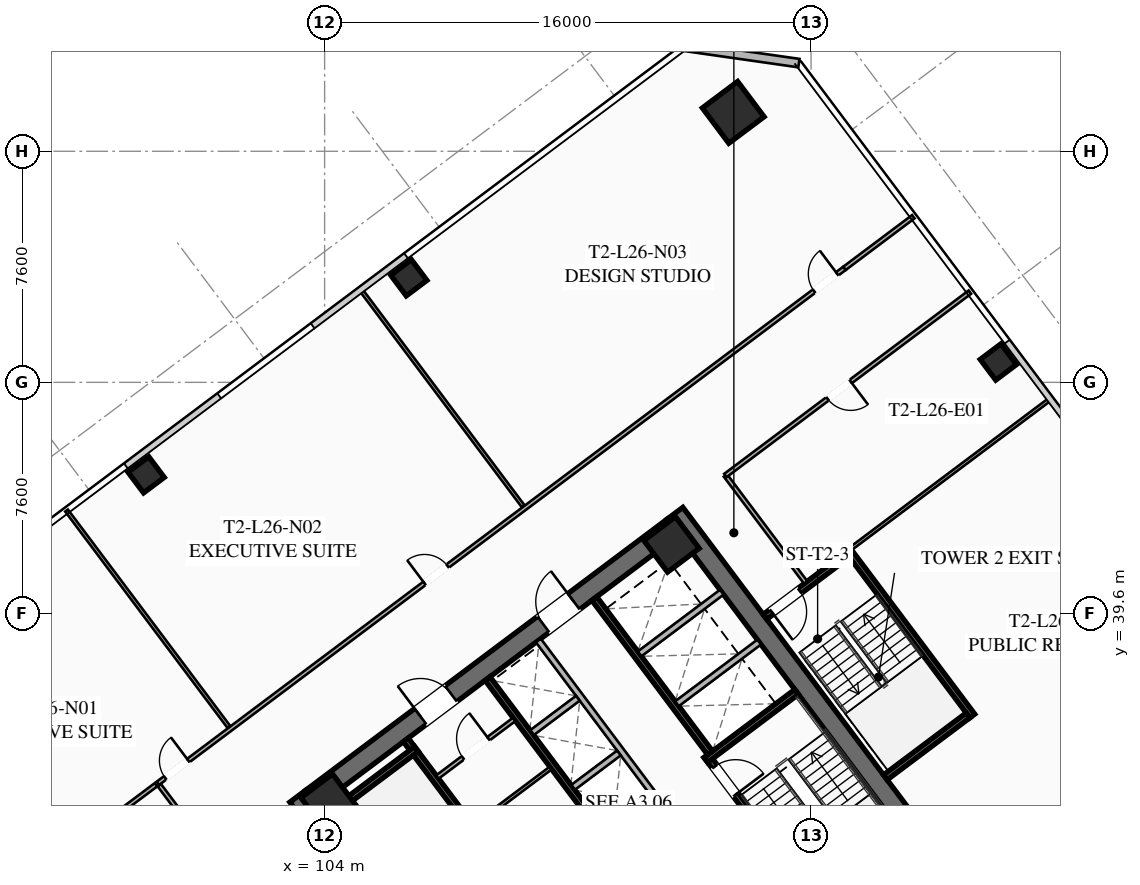
"""IFC4 building model, lengths in metres.
Left out: names, types, materials, properties, quantities, classifications, styles, units other than length and angle.
Written with IfcOpenShell. Run it as: python <this file> out.ifc"""

import sys

from ifc_helpers import new_model, si_unit, direction, frame, frame_2d, origin, origin_2d, place, context, subcontext, project, spatial, rectangle, hollow_rectangle, extrude, element, fill, save


model = new_model("IFC4")
c1 = context("Model", 3, precision=1e-05, world=origin(), true_north=direction((0.0, 1.0)))
c2 = subcontext(c1, "Body", "Model", "MODEL_VIEW")
j1 = project(units=[si_unit("LENGTHUNIT", "METRE"), si_unit("PLANEANGLEUNIT", "RADIAN")], contexts=[c1])
p1 = place(None, origin())
s1 = spatial("IfcSite", under=j1, at=p1, CompositionType="ELEMENT")
p2 = place(p1, origin())
s2 = spatial("IfcBuilding", under=s1, at=p2, CompositionType="ELEMENT")
p3 = place(p2, frame((0.0, 0.0, 99.15)))
s3 = spatial("IfcBuildingStorey", under=s2, at=p3, CompositionType="ELEMENT", Elevation=99.15)
for number, where, z_axis, x_axis in (
    (1, (112.476, 21.107, 0.0), (0.0, 0.0, 1.0), (-0.6, 0.8, 0.0)),
    (2, (115.524, 42.893, 0.0), (0.0, 0.0, 1.0), (0.6, -0.8, 0.0)),
):
    element("IfcWall", number, at=place(p3, frame(where, z_axis=z_axis, x_axis=x_axis)), inside=s3, PredefinedType="SHEAR", context=c2, shape_type="SweptSolid", body=[
        extrude(rectangle(XDim=15.6, YDim=0.65, at=frame_2d((7.8, 0.0))), origin(), (0.0, 0.0, 1.0), 3.55),
    ])
p4 = place(p3, frame((103.571, 33.522, 0.0), z_axis=(0.0, 0.0, 1.0), x_axis=(0.799998028465, 0.600002628705, 0.0)))
e3 = element("IfcWall", 3, at=p4, inside=s3, PredefinedType="SHEAR", context=c2, shape_type="SweptSolid", body=[
    extrude(rectangle(XDim=14.86, YDim=0.65, at=frame_2d((7.43, 0.0))), origin(), (0.0, 0.0, 1.0), 3.55),
])
p5 = place(p4, frame((4.48, 0.0, 0.0)))
e4 = element("IfcOpeningElement", 4, at=p5, cuts=e3, PredefinedType="OPENING", context=c2, shape_type="SweptSolid", body=[
    extrude(rectangle(XDim=1.25, YDim=2.25, at=frame_2d((0.625, 1.125))), frame((0.0, 0.335, 0.0), z_axis=(0.0, -1.0, 0.0), x_axis=(1.0, 0.0, 0.0)), (0.0, 0.0, 1.0), 0.67),
])
p6 = place(p4, frame((9.53, 0.0, 0.0)))
e5 = element("IfcOpeningElement", 5, at=p6, cuts=e3, PredefinedType="OPENING", context=c2, shape_type="SweptSolid", body=[
    extrude(rectangle(XDim=1.25, YDim=2.25, at=frame_2d((0.625, 1.125))), frame((0.0, 0.335, 0.0), z_axis=(0.0, -1.0, 0.0), x_axis=(1.0, 0.0, 0.0)), (0.0, 0.0, 1.0), 0.67),
])
for number, where, z_axis, x_axis in (
    (6, (115.41, 41.87, 0.0), (0.0, 0.0, 1.0), (0.8, 0.6, 0.0)),
    (7, (104.13, 33.41, 0.0), (0.0, 0.0, 1.0), (0.8, 0.6, 0.0)),
):
    element("IfcColumn", number, at=place(p3, frame(where, z_axis=z_axis, x_axis=x_axis)), inside=s3, PredefinedType="COLUMN", context=c2, shape_type="SweptSolid", body=[
        extrude(hollow_rectangle(XDim=1.3, YDim=1.3, WallThickness=0.05, at=origin_2d()), origin(), (0.0, 0.0, 1.0), 3.35),
    ])
p7 = place(p3, frame((117.44, 56.08, 0.0), z_axis=(0.0, 0.0, 1.0), x_axis=(0.799999996291, 0.600000004945, 0.0)))
e8 = element("IfcColumn", 8, at=p7, inside=s3, PredefinedType="COLUMN", context=c2, shape_type="SweptSolid", body=[
    extrude(hollow_rectangle(XDim=1.45, YDim=1.45, WallThickness=0.055, at=origin_2d()), origin(), (0.0, 0.0, 1.0), 3.35),
])
for number, where, z_axis, x_axis in (
    (9, (126.16, 47.87, 0.0), (0.0, 0.0, 1.0), (0.8, 0.6, 0.0)),
    (10, (106.77, 50.64, 0.0), (0.0, 0.0, 1.0), (0.8, 0.6, 0.0)),
    (11, (98.13, 44.16, 0.0), (0.0, 0.0, 1.0), (0.8, 0.6, 0.0)),
):
    element("IfcColumn", number, at=place(p3, frame(where, z_axis=z_axis, x_axis=x_axis)), inside=s3, PredefinedType="COLUMN", context=c2, shape_type="SweptSolid", body=[
        extrude(hollow_rectangle(XDim=0.85, YDim=0.85, WallThickness=0.035, at=origin_2d()), origin(), (0.0, 0.0, 1.0), 3.35),
    ])
p8 = place(p3, frame((115.82, 58.24, 0.0), z_axis=(0.0, 0.0, 1.0), x_axis=(0.989948214866, -0.141430307517, 0.0)))
e12 = element("IfcWall", 12, at=p8, inside=s3, PredefinedType="SOLIDWALL", context=c2, shape_type="SweptSolid", body=[
    extrude(rectangle(XDim=3.818, YDim=0.28, at=frame_2d((1.909, 0.0))), origin(), (0.0, 0.0, 1.0), 3.35),
])
p9 = place(p3, frame((111.44, 29.08, 0.0), z_axis=(0.0, 0.0, 1.0), x_axis=(-0.600009827119, 0.799992629566, 0.0)))
e13 = element("IfcWall", 13, at=p9, inside=s3, PredefinedType="SHEAR", context=c2, shape_type="SweptSolid", body=[
    extrude(rectangle(XDim=7.95, YDim=0.2, at=frame_2d((3.975, 0.0))), origin(), (0.0, 0.0, 1.0), 3.35),
])
p10 = place(p9, frame((0.45, 0.0, 0.0)))
e14 = element("IfcOpeningElement", 14, at=p10, cuts=e13, PredefinedType="OPENING", context=c2, shape_type="SweptSolid", body=[
    extrude(rectangle(XDim=1.15, YDim=2.2, at=frame_2d((0.575, 1.1))), frame((0.0, 0.11, 0.0), z_axis=(0.0, -1.0, 0.0), x_axis=(1.0, 0.0, 0.0)), (0.0, 0.0, 1.0), 0.22),
])
p11 = place(p3, frame((104.036, 32.902, 0.0), z_axis=(0.0, 0.0, 1.0), x_axis=(0.800039270442, 0.59994763584, 0.0)))
e15 = element("IfcWall", 15, at=p11, inside=s3, PredefinedType="SHEAR", context=c2, shape_type="SweptSolid", body=[
    extrude(rectangle(XDim=3.73, YDim=0.2, at=frame_2d((1.865, 0.0))), origin(), (0.0, 0.0, 1.0), 3.35),
])
p12 = place(p3, frame((116.56, 34.92, 0.0), z_axis=(0.0, 0.0, 1.0), x_axis=(0.600009827119, -0.799992629566, 0.0)))
e16 = element("IfcWall", 16, at=p12, inside=s3, PredefinedType="SHEAR", context=c2, shape_type="SweptSolid", body=[
    extrude(rectangle(XDim=7.95, YDim=0.2, at=frame_2d((3.975, 0.0))), origin(), (0.0, 0.0, 1.0), 3.35),
])
p13 = place(p12, frame((0.45, 0.0, 0.0)))
e17 = element("IfcOpeningElement", 17, at=p13, cuts=e16, PredefinedType="OPENING", context=c2, shape_type="SweptSolid", body=[
    extrude(rectangle(XDim=1.15, YDim=2.2, at=frame_2d((0.575, 1.1))), frame((0.0, 0.11, 0.0), z_axis=(0.0, -1.0, 0.0), x_axis=(1.0, 0.0, 0.0)), (0.0, 0.0, 1.0), 0.22),
])
p14 = place(p3, frame((116.54, 34.78, 0.0), z_axis=(0.0, 0.0, 1.0), x_axis=(0.799984290658, 0.600020945218, 0.0)))
e18 = element("IfcWall", 18, at=p14, inside=s3, PredefinedType="SHEAR", context=c2, shape_type="SweptSolid", body=[
    extrude(rectangle(XDim=3.73, YDim=0.2, at=frame_2d((1.865, 0.0))), origin(), (0.0, 0.0, 1.0), 3.35),
])
p15 = place(p3, frame((117.938, 26.016, 0.0), z_axis=(0.0, 0.0, 1.0), x_axis=(-0.600005463273, 0.799995902516, 0.0)))
e19 = element("IfcWall", 19, at=p15, inside=s3, PredefinedType="SHEAR", context=c2, shape_type="SweptSolid", body=[
    extrude(rectangle(XDim=14.3, YDim=0.2, at=frame_2d((7.15, 0.0))), origin(), (0.0, 0.0, 1.0), 3.35),
])
p16 = place(p3, frame((112.87, 40.09, 0.0), z_axis=(0.0, 0.0, 1.0), x_axis=(0.599975393228, -0.800018454488, 0.0)))
e20 = element("IfcWall", 20, at=p16, inside=s3, PredefinedType="SHEAR", context=c2, shape_type="SweptSolid", body=[
    extrude(rectangle(XDim=6.35, YDim=0.2, at=frame_2d((3.175, 0.0))), origin(), (0.0, 0.0, 1.0), 3.35),
])
for number, where, z_axis, x_axis in (
    (21, (115.59, 36.63, 0.0), (0.0, 0.0, 1.0), (0.8, 0.6, 0.0)),
    (22, (114.36, 38.27, 0.0), (0.0, 0.0, 1.0), (0.8, 0.6, 0.0)),
):
    element("IfcWall", number, at=place(p3, frame(where, z_axis=z_axis, x_axis=x_axis)), inside=s3, PredefinedType="SOLIDWALL", context=c2, shape_type="SweptSolid", body=[
        extrude(rectangle(XDim=3.38, YDim=0.2, at=frame_2d((1.69, 0.0))), origin(), (0.0, 0.0, 1.0), 3.35),
    ])
p17 = place(p3, frame((107.71, 34.22, 0.0), z_axis=(0.0, 0.0, 1.0), x_axis=(0.799981399002, 0.60002480053, 0.0)))
e23 = element("IfcWall", 23, at=p17, inside=s3, PredefinedType="PARTITIONING", context=c2, shape_type="SweptSolid", body=[
    extrude(rectangle(XDim=3.15, YDim=0.135, at=frame_2d((1.575, 0.0))), origin(), (0.0, 0.0, 1.0), 2.703),
])
p18 = place(p17, frame((1.05, 0.0, 0.0)))
e24 = element("IfcOpeningElement", 24, at=p18, cuts=e23, PredefinedType="OPENING", context=c2, shape_type="SweptSolid", body=[
    extrude(rectangle(XDim=1.05, YDim=2.2, at=frame_2d((0.525, 1.1))), frame((0.0, 0.077, 0.0), z_axis=(0.0, -1.0, 0.0), x_axis=(1.0, 0.0, 0.0)), (0.0, 0.0, 1.0), 0.155),
])
p19 = place(p3, frame((108.91, 32.62, 0.0), z_axis=(0.0, 0.0, 1.0), x_axis=(0.800018601094, 0.59997519774, 0.0)))
e25 = element("IfcWall", 25, at=p19, inside=s3, PredefinedType="PARTITIONING", context=c2, shape_type="SweptSolid", body=[
    extrude(rectangle(XDim=3.15, YDim=0.11, at=frame_2d((1.575, 0.0))), origin(), (0.0, 0.0, 1.0), 2.703),
])
p20 = place(p3, frame((115.11, 33.27, 0.0), z_axis=(0.0, 0.0, 1.0), x_axis=(-0.600011488909, 0.79999138319, 0.0)))
e26 = element("IfcWall", 26, at=p20, inside=s3, PredefinedType="SOLIDWALL", context=c2, shape_type="SweptSolid", body=[
    extrude(rectangle(XDim=6.8, YDim=0.2, at=frame_2d((3.4, 0.0))), origin(), (0.0, 0.0, 1.0), 3.35),
])
p21 = place(p3, frame((112.176, 33.882, 0.0), z_axis=(0.0, 0.0, 1.0), x_axis=(0.8, 0.6, 0.0)))
e27 = element("IfcWall", 27, at=p21, inside=s3, PredefinedType="SOLIDWALL", context=c2, shape_type="SweptSolid", body=[
    extrude(rectangle(XDim=1.88, YDim=0.2, at=frame_2d((0.94, 0.0))), origin(), (0.0, 0.0, 1.0), 3.35),
])
p22 = place(p3, frame((110.826, 35.682, 0.0), z_axis=(0.0, 0.0, 1.0), x_axis=(0.799984418148, 0.600020775241, 0.0)))
e28 = element("IfcWall", 28, at=p22, inside=s3, PredefinedType="SOLIDWALL", context=c2, shape_type="SweptSolid", body=[
    extrude(rectangle(XDim=1.88, YDim=0.2, at=frame_2d((0.94, 0.0))), origin(), (0.0, 0.0, 1.0), 3.35),
])
p23 = place(p3, frame((125.304, 36.228, 0.0), z_axis=(0.0, 0.0, 1.0), x_axis=(-0.59998851072, 0.800008616831, 0.0)))
e29 = element("IfcWall", 29, at=p23, inside=s3, PredefinedType="SHEAR", context=c2, shape_type="SweptSolid", body=[
    extrude(rectangle(XDim=6.8, YDim=0.2, at=frame_2d((3.4, 0.0))), origin(), (0.0, 0.0, 1.0), 3.35),
])
p24 = place(p3, frame((121.204, 41.528, 0.0), z_axis=(0.0, 0.0, 1.0), x_axis=(-0.800017232136, -0.599977023131, 0.0)))
e30 = element("IfcWall", 30, at=p24, inside=s3, PredefinedType="SHEAR", context=c2, shape_type="SweptSolid", body=[
    extrude(rectangle(XDim=3.4, YDim=0.2, at=frame_2d((1.7, 0.0))), origin(), (0.0, 0.0, 1.0), 3.35),
])
p25 = place(p24, frame((1.975, 0.0, 0.0)))
e31 = element("IfcOpeningElement", 31, at=p25, cuts=e30, PredefinedType="OPENING", context=c2, shape_type="SweptSolid", body=[
    extrude(rectangle(XDim=1.15, YDim=2.2, at=frame_2d((0.575, 1.1))), frame((0.0, 0.11, 0.0), z_axis=(0.0, -1.0, 0.0), x_axis=(1.0, 0.0, 0.0)), (0.0, 0.0, 1.0), 0.22),
])
p26 = place(p3, frame((122.444, 34.208, 0.0), z_axis=(0.0, 0.0, 1.0), x_axis=(0.79999138319, 0.600011488909, 0.0)))
e32 = element("IfcWall", 32, at=p26, inside=s3, PredefinedType="SHEAR", context=c2, shape_type="SweptSolid", body=[
    extrude(rectangle(XDim=3.4, YDim=0.2, at=frame_2d((1.7, 0.0))), origin(), (0.0, 0.0, 1.0), 3.35),
])
p27 = place(p3, frame((119.824, 40.618, 0.0), z_axis=(0.0, 0.0, 1.0), x_axis=(-0.599982243973, 0.800013316712, 0.0)))
e33 = element("IfcWall", 33, at=p27, inside=s3, PredefinedType="PARTITIONING", context=c2, shape_type="SweptSolid", body=[
    extrude(rectangle(XDim=4.4, YDim=0.135, at=frame_2d((2.2, 0.0))), origin(), (0.0, 0.0, 1.0), 2.703),
])
p28 = place(p3, frame((98.516, 34.012, 0.0), z_axis=(0.0, 0.0, 1.0), x_axis=(0.8, 0.6, 0.0)))
e34 = element("IfcWall", 34, at=p28, inside=s3, PredefinedType="PARTITIONING", context=c2, shape_type="SweptSolid", body=[
    extrude(rectangle(XDim=28.23, YDim=0.135, at=frame_2d((14.115, 0.0))), origin(), (0.0, 0.0, 1.0), 2.703),
])
p29 = place(p28, frame((0.3, 0.0, 0.0)))
e35 = element("IfcOpeningElement", 35, at=p29, cuts=e34, PredefinedType="OPENING", context=c2, shape_type="SweptSolid", body=[
    extrude(rectangle(XDim=0.95, YDim=2.05, at=frame_2d((0.475, 1.025))), frame((0.0, 0.077, 0.0), z_axis=(0.0, -1.0, 0.0), x_axis=(1.0, 0.0, 0.0)), (0.0, 0.0, 1.0), 0.155),
])
p30 = place(p28, frame((10.962, 0.0, 0.0)))
e36 = element("IfcOpeningElement", 36, at=p30, cuts=e34, PredefinedType="OPENING", context=c2, shape_type="SweptSolid", body=[
    extrude(rectangle(XDim=0.95, YDim=2.05, at=frame_2d((0.475, 1.025))), frame((0.0, 0.077, 0.0), z_axis=(0.0, -1.0, 0.0), x_axis=(1.0, 0.0, 0.0)), (0.0, 0.0, 1.0), 0.155),
])
p31 = place(p28, frame((26.98, 0.0, 0.0)))
e37 = element("IfcOpeningElement", 37, at=p31, cuts=e34, PredefinedType="OPENING", context=c2, shape_type="SweptSolid", body=[
    extrude(rectangle(XDim=0.95, YDim=2.05, at=frame_2d((0.475, 1.025))), frame((0.0, 0.077, 0.0), z_axis=(0.0, -1.0, 0.0), x_axis=(1.0, 0.0, 0.0)), (0.0, 0.0, 1.0), 0.155),
])
p32 = place(p3, frame((121.1, 50.95, 0.0), z_axis=(0.0, 0.0, 1.0), x_axis=(0.799989647378, 0.600013803248, 0.0)))
e38 = element("IfcWall", 38, at=p32, inside=s3, PredefinedType="PARTITIONING", context=c2, shape_type="SweptSolid", body=[
    extrude(rectangle(XDim=2.83, YDim=0.135, at=frame_2d((1.415, 0.0))), origin(), (0.0, 0.0, 1.0), 2.703),
])
for number, where, z_axis, x_axis in (
    (39, (100.852, 35.864, 0.0), (0.0, 0.0, 1.0), (-0.6, 0.8, 0.0)),
    (40, (110.532, 43.124, 0.0), (0.0, 0.0, 1.0), (-0.6, 0.8, 0.0)),
):
    element("IfcWall", number, at=place(p3, frame(where, z_axis=z_axis, x_axis=x_axis)), inside=s3, PredefinedType="PARTITIONING", context=c2, shape_type="SweptSolid", body=[
        extrude(rectangle(XDim=8.9, YDim=0.11, at=frame_2d((4.45, 0.0))), origin(), (0.0, 0.0, 1.0), 2.703),
    ])
p33 = place(p3, frame((134.18, 33.51, 0.0), z_axis=(0.0, 0.0, 1.0), x_axis=(-0.8, -0.6, 0.0)))
e41 = element("IfcWall", 41, at=p33, inside=s3, PredefinedType="PARTITIONING", context=c2, shape_type="SweptSolid", body=[
    extrude(rectangle(XDim=28.23, YDim=0.135, at=frame_2d((14.115, 0.0))), origin(), (0.0, 0.0, 1.0), 2.703),
])
p34 = place(p33, frame((26.9, 0.0, 0.0)))
e42 = element("IfcOpeningElement", 42, at=p34, cuts=e41, PredefinedType="OPENING", context=c2, shape_type="SweptSolid", body=[
    extrude(rectangle(XDim=0.95, YDim=2.05, at=frame_2d((0.475, 1.025))), frame((0.0, 0.077, 0.0), z_axis=(0.0, -1.0, 0.0), x_axis=(1.0, 0.0, 0.0)), (0.0, 0.0, 1.0), 0.155),
])
p35 = place(p33, frame((16.296, 0.0, 0.0)))
e43 = element("IfcOpeningElement", 43, at=p35, cuts=e41, PredefinedType="OPENING", context=c2, shape_type="SweptSolid", body=[
    extrude(rectangle(XDim=0.95, YDim=2.05, at=frame_2d((0.475, 1.025))), frame((0.0, 0.077, 0.0), z_axis=(0.0, -1.0, 0.0), x_axis=(1.0, 0.0, 0.0)), (0.0, 0.0, 1.0), 0.155),
])
p36 = place(p33, frame((10.433, 0.0, 0.0)))
e44 = element("IfcOpeningElement", 44, at=p36, cuts=e41, PredefinedType="OPENING", context=c2, shape_type="SweptSolid", body=[
    extrude(rectangle(XDim=0.95, YDim=2.05, at=frame_2d((0.475, 1.025))), frame((0.0, 0.077, 0.0), z_axis=(0.0, -1.0, 0.0), x_axis=(1.0, 0.0, 0.0)), (0.0, 0.0, 1.0), 0.155),
])
p37 = place(p33, frame((0.38, 0.0, 0.0)))
e45 = element("IfcOpeningElement", 45, at=p37, cuts=e41, PredefinedType="OPENING", context=c2, shape_type="SweptSolid", body=[
    extrude(rectangle(XDim=0.95, YDim=2.05, at=frame_2d((0.475, 1.025))), frame((0.0, 0.077, 0.0), z_axis=(0.0, -1.0, 0.0), x_axis=(1.0, 0.0, 0.0)), (0.0, 0.0, 1.0), 0.155),
])
p38 = place(p3, frame((125.224, 50.168, 0.0), z_axis=(0.0, 0.0, 1.0), x_axis=(-0.8, -0.6, 0.0)))
e46 = element("IfcWall", 46, at=p38, inside=s3, PredefinedType="PARTITIONING", context=c2, shape_type="SweptSolid", body=[
    extrude(rectangle(XDim=10.05, YDim=0.135, at=frame_2d((5.025, 0.0))), origin(), (0.0, 0.0, 1.0), 2.703),
])
p39 = place(p38, frame((4.9, 0.0, 0.0)))
e47 = element("IfcOpeningElement", 47, at=p39, cuts=e46, PredefinedType="OPENING", context=c2, shape_type="SweptSolid", body=[
    extrude(rectangle(XDim=0.95, YDim=2.05, at=frame_2d((0.475, 1.025))), frame((0.0, 0.077, 0.0), z_axis=(0.0, -1.0, 0.0), x_axis=(1.0, 0.0, 0.0)), (0.0, 0.0, 1.0), 0.155),
])
p40 = place(p3, frame((125.208, 30.656, 0.0), z_axis=(0.0, 0.0, 1.0), x_axis=(0.8, 0.6, 0.0)))
e48 = element("IfcWall", 48, at=p40, inside=s3, PredefinedType="PARTITIONING", context=c2, shape_type="SweptSolid", body=[
    extrude(rectangle(XDim=11.72, YDim=0.135, at=frame_2d((5.86, 0.0))), origin(), (0.0, 0.0, 1.0), 2.703),
])
p41 = place(p40, frame((2.045, 0.0, 0.0)))
e49 = element("IfcOpeningElement", 49, at=p41, cuts=e48, PredefinedType="OPENING", context=c2, shape_type="SweptSolid", body=[
    extrude(rectangle(XDim=0.95, YDim=2.05, at=frame_2d((0.475, 1.025))), frame((0.0, 0.077, 0.0), z_axis=(0.0, -1.0, 0.0), x_axis=(1.0, 0.0, 0.0)), (0.0, 0.0, 1.0), 0.155),
])
p42 = place(p3, frame((127.864, 46.648, 0.0), z_axis=(0.0, 0.0, 1.0), x_axis=(-0.800007145523, -0.599990472518, 0.0)))
e50 = element("IfcWall", 50, at=p42, inside=s3, PredefinedType="PARTITIONING", context=c2, shape_type="SweptSolid", body=[
    extrude(rectangle(XDim=8.2, YDim=0.11, at=frame_2d((4.1, 0.0))), origin(), (0.0, 0.0, 1.0), 2.703),
])
p43 = place(p3, frame((111.548, 16.636, 0.0), z_axis=(0.0, 0.0, 1.0), x_axis=(-0.600003610192, 0.799997292343, 0.0)))
e51 = element("IfcWall", 51, at=p43, inside=s3, PredefinedType="PARTITIONING", context=c2, shape_type="SweptSolid", body=[
    extrude(rectangle(XDim=21.64, YDim=0.135, at=frame_2d((10.82, 0.0))), origin(), (0.0, 0.0, 1.0), 2.703),
])
p44 = place(p43, frame((0.3, 0.0, 0.0)))
e52 = element("IfcOpeningElement", 52, at=p44, cuts=e51, PredefinedType="OPENING", context=c2, shape_type="SweptSolid", body=[
    extrude(rectangle(XDim=0.95, YDim=2.05, at=frame_2d((0.475, 1.025))), frame((0.0, 0.077, 0.0), z_axis=(0.0, -1.0, 0.0), x_axis=(1.0, 0.0, 0.0)), (0.0, 0.0, 1.0), 0.155),
])
p45 = place(p3, frame((98.452, 33.964, 0.0), z_axis=(0.0, 0.0, 1.0), x_axis=(-0.799993202584, -0.600009063115, 0.0)))
e53 = element("IfcWall", 53, at=p45, inside=s3, PredefinedType="PARTITIONING", context=c2, shape_type="SweptSolid", body=[
    extrude(rectangle(XDim=8.62, YDim=0.135, at=frame_2d((4.31, 0.0))), origin(), (0.0, 0.0, 1.0), 2.703),
])
p46 = place(p5, origin())
e54 = element("IfcDoor", 54, at=p46, inside=s3, OperationType="SINGLE_SWING_LEFT", PredefinedType="DOOR", context=c2, shape_type="SweptSolid", body=[
    extrude(rectangle(XDim=1.25, YDim=2.25, at=frame_2d((0.625, 1.125))), frame((0.0, 0.025, 0.0), z_axis=(0.0, -1.0, 0.0), x_axis=(1.0, 0.0, 0.0)), (0.0, 0.0, 1.0), 0.05),
])
fill(e4, e54)
p47 = place(p6, origin())
e55 = element("IfcDoor", 55, at=p47, inside=s3, OperationType="SINGLE_SWING_RIGHT", PredefinedType="DOOR", context=c2, shape_type="SweptSolid", body=[
    extrude(rectangle(XDim=1.25, YDim=2.25, at=frame_2d((0.625, 1.125))), frame((0.0, 0.025, 0.0), z_axis=(0.0, -1.0, 0.0), x_axis=(1.0, 0.0, 0.0)), (0.0, 0.0, 1.0), 0.05),
])
fill(e5, e55)
p48 = place(p13, origin())
e56 = element("IfcDoor", 56, at=p48, inside=s3, OperationType="SINGLE_SWING_RIGHT", PredefinedType="DOOR", context=c2, shape_type="SweptSolid", body=[
    extrude(rectangle(XDim=1.15, YDim=2.2, at=frame_2d((0.575, 1.1))), frame((0.0, 0.025, 0.0), z_axis=(0.0, -1.0, 0.0), x_axis=(1.0, 0.0, 0.0)), (0.0, 0.0, 1.0), 0.05),
])
fill(e17, e56)
p49 = place(p18, origin())
e57 = element("IfcDoor", 57, at=p49, inside=s3, OperationType="SINGLE_SWING_RIGHT", PredefinedType="DOOR", context=c2, shape_type="SweptSolid", body=[
    extrude(rectangle(XDim=1.05, YDim=2.2, at=frame_2d((0.525, 1.1))), frame((0.0, 0.025, 0.0), z_axis=(0.0, -1.0, 0.0), x_axis=(1.0, 0.0, 0.0)), (0.0, 0.0, 1.0), 0.05),
])
fill(e24, e57)
p50 = place(p25, origin())
e58 = element("IfcDoor", 58, at=p50, inside=s3, OperationType="SINGLE_SWING_RIGHT", PredefinedType="DOOR", context=c2, shape_type="SweptSolid", body=[
    extrude(rectangle(XDim=1.15, YDim=2.2, at=frame_2d((0.575, 1.1))), frame((0.0, 0.025, 0.0), z_axis=(0.0, -1.0, 0.0), x_axis=(1.0, 0.0, 0.0)), (0.0, 0.0, 1.0), 0.05),
])
fill(e31, e58)
p51 = place(p29, origin())
e59 = element("IfcDoor", 59, at=p51, inside=s3, OperationType="SINGLE_SWING_RIGHT", PredefinedType="DOOR", context=c2, shape_type="SweptSolid", body=[
    extrude(rectangle(XDim=0.95, YDim=2.05, at=frame_2d((0.475, 1.025))), frame((0.0, 0.025, 0.0), z_axis=(0.0, -1.0, 0.0), x_axis=(1.0, 0.0, 0.0)), (0.0, 0.0, 1.0), 0.05),
])
fill(e35, e59)
p52 = place(p30, origin())
e60 = element("IfcDoor", 60, at=p52, inside=s3, OperationType="SINGLE_SWING_LEFT", PredefinedType="DOOR", context=c2, shape_type="SweptSolid", body=[
    extrude(rectangle(XDim=0.95, YDim=2.05, at=frame_2d((0.475, 1.025))), frame((0.0, 0.025, 0.0), z_axis=(0.0, -1.0, 0.0), x_axis=(1.0, 0.0, 0.0)), (0.0, 0.0, 1.0), 0.05),
])
fill(e36, e60)
p53 = place(p31, origin())
e61 = element("IfcDoor", 61, at=p53, inside=s3, OperationType="SINGLE_SWING_RIGHT", PredefinedType="DOOR", context=c2, shape_type="SweptSolid", body=[
    extrude(rectangle(XDim=0.95, YDim=2.05, at=frame_2d((0.475, 1.025))), frame((0.0, 0.025, 0.0), z_axis=(0.0, -1.0, 0.0), x_axis=(1.0, 0.0, 0.0)), (0.0, 0.0, 1.0), 0.05),
])
fill(e37, e61)
p54 = place(p39, origin())
e62 = element("IfcDoor", 62, at=p54, inside=s3, OperationType="SINGLE_SWING_LEFT", PredefinedType="DOOR", context=c2, shape_type="SweptSolid", body=[
    extrude(rectangle(XDim=0.95, YDim=2.05, at=frame_2d((0.475, 1.025))), frame((0.0, 0.025, 0.0), z_axis=(0.0, -1.0, 0.0), x_axis=(1.0, 0.0, 0.0)), (0.0, 0.0, 1.0), 0.05),
])
fill(e47, e62)
save(model, sys.argv[1])
